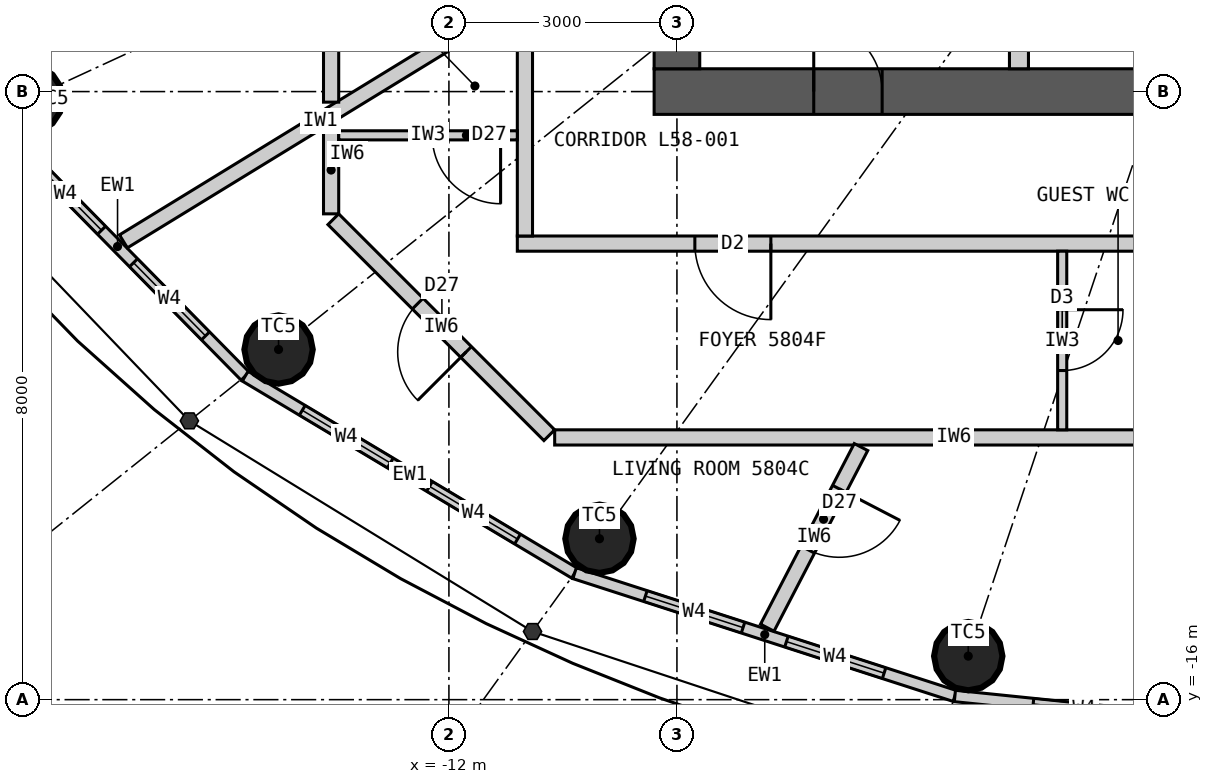
"""IFC4 building model, lengths in metres.
Left out: names, types, materials, properties, quantities, classifications, styles, units other than length and angle.
Written with IfcOpenShell. Run it as: python <this file> out.ifc"""

import sys

from ifc_helpers import new_model, si_unit, direction, frame, frame_2d, origin, origin_2d, place, context, subcontext, project, spatial, rectangle, circle, extrude, element, fill, save


model = new_model("IFC4")
c1 = context("Model", 3, precision=1e-05, world=origin(), true_north=direction((0.0, 1.0)))
c2 = subcontext(c1, "Body", "Model", "MODEL_VIEW")
j1 = project(units=[si_unit("LENGTHUNIT", "METRE"), si_unit("PLANEANGLEUNIT", "RADIAN")], contexts=[c1])
p1 = place(None, origin())
s1 = spatial("IfcSite", under=j1, at=p1, CompositionType="ELEMENT")
p2 = place(p1, origin())
s2 = spatial("IfcBuilding", under=s1, at=p2, CompositionType="ELEMENT")
p3 = place(p2, frame((0.0, 0.0, 216.0)))
s3 = spatial("IfcBuildingStorey", under=s2, at=p3, CompositionType="ELEMENT", Elevation=216.0)
for number, where, z_axis, x_axis in (
    (1, (-17.532, -8.098, 0.0), (0.0, 0.0, 1.0), (1.0, 0.0, 0.0)),
    (2, (-14.241, -11.393, 0.0), (0.0, 0.0, 1.0), (1.0, 0.0, 0.0)),
    (3, (-10.019, -13.883, 0.0), (0.0, 0.0, 1.0), (1.0, 0.0, 0.0)),
    (4, (-5.167, -15.427, 0.0), (0.0, 0.0, 1.0), (1.0, 0.0, 0.0)),
):
    element("IfcColumn", number, at=place(p3, frame(where, z_axis=z_axis, x_axis=x_axis)), inside=s3, PredefinedType="COLUMN", context=c2, shape_type="SweptSolid", body=[
        extrude(circle(Radius=0.45, at=origin_2d()), origin(), (0.0, 0.0, 1.0), 3.3),
    ])
p4 = place(p3, frame((9.3, -8.0, 0.0), z_axis=(0.0, 0.0, 1.0), x_axis=(-1.0, 0.0, 0.0)))
e5 = element("IfcWall", 5, at=p4, inside=s3, PredefinedType="SHEAR", context=c2, shape_type="SweptSolid", body=[
    extrude(rectangle(XDim=18.6, YDim=0.6, at=frame_2d((9.3, 0.0))), origin(), (0.0, 0.0, 1.0), 3.3),
])
p5 = place(p4, frame((8.0, 0.0, 0.0)))
e6 = element("IfcOpeningElement", 6, at=p5, cuts=e5, PredefinedType="OPENING", context=c2, shape_type="SweptSolid", body=[
    extrude(rectangle(XDim=1.2, YDim=2.2, at=frame_2d((0.6, 1.1))), frame((0.0, 0.31, 0.0), z_axis=(0.0, -1.0, 0.0), x_axis=(1.0, 0.0, 0.0)), (0.0, 0.0, 1.0), 0.62),
])
p6 = place(p4, frame((15.6, 0.0, 0.0)))
e7 = element("IfcOpeningElement", 7, at=p6, cuts=e5, PredefinedType="OPENING", context=c2, shape_type="SweptSolid", body=[
    extrude(rectangle(XDim=0.9, YDim=2.2, at=frame_2d((0.45, 1.1))), frame((0.0, 0.31, 0.0), z_axis=(0.0, -1.0, 0.0), x_axis=(1.0, 0.0, 0.0)), (0.0, 0.0, 1.0), 0.62),
])
p7 = place(p3, frame((-9.0, 7.7, 0.0), z_axis=(0.0, 0.0, 1.0), x_axis=(0.0, -1.0, 0.0)))
e8 = element("IfcWall", 8, at=p7, inside=s3, PredefinedType="SHEAR", context=c2, shape_type="SweptSolid", body=[
    extrude(rectangle(XDim=15.4, YDim=0.6, at=frame_2d((7.7, 0.0))), origin(), (0.0, 0.0, 1.0), 3.3),
])
p8 = place(p7, frame((6.8, 0.0, 0.0)))
e9 = element("IfcOpeningElement", 9, at=p8, cuts=e8, PredefinedType="OPENING", context=c2, shape_type="SweptSolid", body=[
    extrude(rectangle(XDim=1.8, YDim=2.2, at=frame_2d((0.9, 1.1))), frame((0.0, 0.31, 0.0), z_axis=(0.0, -1.0, 0.0), x_axis=(1.0, 0.0, 0.0)), (0.0, 0.0, 1.0), 0.62),
])
p9 = place(p3, frame((-4.5, -7.7, 0.0), z_axis=(0.0, 0.0, 1.0), x_axis=(0.0, 1.0, 0.0)))
e10 = element("IfcWall", 10, at=p9, inside=s3, PredefinedType="PARTITIONING", context=c2, shape_type="SweptSolid", body=[
    extrude(rectangle(XDim=3.2, YDim=0.25, at=frame_2d((1.6, 0.0))), origin(), (0.0, 0.0, 1.0), 3.3),
])
p10 = place(p3, frame((-18.04, -8.332, 0.0), z_axis=(0.0, 0.0, 1.0), x_axis=(0.701527379618, -0.712642501993, 0.0)))
e11 = element("IfcWall", 11, at=p10, inside=s3, PredefinedType="ELEMENTEDWALL", context=c2, shape_type="SweptSolid", body=[
    extrude(rectangle(XDim=4.788, YDim=0.15, at=frame_2d((2.394, 0.0))), origin(), (0.0, 0.0, 1.0), 3.12),
])
p11 = place(p10, frame((0.744, 0.0, 0.9)))
e12 = element("IfcOpeningElement", 12, at=p11, cuts=e11, PredefinedType="OPENING", context=c2, shape_type="SweptSolid", body=[
    extrude(rectangle(XDim=1.35, YDim=1.9, at=frame_2d((0.675, 0.95))), frame((0.0, 0.085, 0.0), z_axis=(0.0, -1.0, 0.0), x_axis=(1.0, 0.0, 0.0)), (0.0, 0.0, 1.0), 0.17),
])
p12 = place(p10, frame((2.694, 0.0, 0.9)))
e13 = element("IfcOpeningElement", 13, at=p12, cuts=e11, PredefinedType="OPENING", context=c2, shape_type="SweptSolid", body=[
    extrude(rectangle(XDim=1.35, YDim=1.9, at=frame_2d((0.675, 0.95))), frame((0.0, 0.085, 0.0), z_axis=(0.0, -1.0, 0.0), x_axis=(1.0, 0.0, 0.0)), (0.0, 0.0, 1.0), 0.17),
])
p13 = place(p3, frame((-14.68, -11.744, 0.0), z_axis=(0.0, 0.0, 1.0), x_axis=(0.85822150553, -0.513279502265, 0.0)))
e14 = element("IfcWall", 14, at=p13, inside=s3, PredefinedType="ELEMENTEDWALL", context=c2, shape_type="SweptSolid", body=[
    extrude(rectangle(XDim=5.05, YDim=0.15, at=frame_2d((2.525, 0.0))), origin(), (0.0, 0.0, 1.0), 3.12),
])
p14 = place(p13, frame((0.875, 0.0, 0.9)))
e15 = element("IfcOpeningElement", 15, at=p14, cuts=e14, PredefinedType="OPENING", context=c2, shape_type="SweptSolid", body=[
    extrude(rectangle(XDim=1.35, YDim=1.9, at=frame_2d((0.675, 0.95))), frame((0.0, 0.085, 0.0), z_axis=(0.0, -1.0, 0.0), x_axis=(1.0, 0.0, 0.0)), (0.0, 0.0, 1.0), 0.17),
])
p15 = place(p13, frame((2.825, 0.0, 0.9)))
e16 = element("IfcOpeningElement", 16, at=p15, cuts=e14, PredefinedType="OPENING", context=c2, shape_type="SweptSolid", body=[
    extrude(rectangle(XDim=1.35, YDim=1.9, at=frame_2d((0.675, 0.95))), frame((0.0, 0.085, 0.0), z_axis=(0.0, -1.0, 0.0), x_axis=(1.0, 0.0, 0.0)), (0.0, 0.0, 1.0), 0.17),
])
p16 = place(p3, frame((-10.346, -14.336, 0.0), z_axis=(0.0, 0.0, 1.0), x_axis=(0.951644702515, -0.307200846638, 0.0)))
e17 = element("IfcWall", 17, at=p16, inside=s3, PredefinedType="ELEMENTEDWALL", context=c2, shape_type="SweptSolid", body=[
    extrude(rectangle(XDim=5.258, YDim=0.15, at=frame_2d((2.629, 0.0))), origin(), (0.0, 0.0, 1.0), 3.12),
])
p17 = place(p16, frame((0.979, 0.0, 0.9)))
e18 = element("IfcOpeningElement", 18, at=p17, cuts=e17, PredefinedType="OPENING", context=c2, shape_type="SweptSolid", body=[
    extrude(rectangle(XDim=1.35, YDim=1.9, at=frame_2d((0.675, 0.95))), frame((0.0, 0.085, 0.0), z_axis=(0.0, -1.0, 0.0), x_axis=(1.0, 0.0, 0.0)), (0.0, 0.0, 1.0), 0.17),
])
p18 = place(p16, frame((2.929, 0.0, 0.9)))
e19 = element("IfcOpeningElement", 19, at=p18, cuts=e17, PredefinedType="OPENING", context=c2, shape_type="SweptSolid", body=[
    extrude(rectangle(XDim=1.35, YDim=1.9, at=frame_2d((0.675, 0.95))), frame((0.0, 0.085, 0.0), z_axis=(0.0, -1.0, 0.0), x_axis=(1.0, 0.0, 0.0)), (0.0, 0.0, 1.0), 0.17),
])
p19 = place(p3, frame((-5.343, -15.952, 0.0), z_axis=(0.0, 0.0, 1.0), x_axis=(0.994774574972, -0.102095763818, 0.0)))
e20 = element("IfcWall", 20, at=p19, inside=s3, PredefinedType="ELEMENTEDWALL", context=c2, shape_type="SweptSolid", body=[
    extrude(rectangle(XDim=5.371, YDim=0.15, at=frame_2d((2.686, 0.0))), origin(), (0.0, 0.0, 1.0), 3.12),
])
p20 = place(p19, frame((1.035, 0.0, 0.9)))
e21 = element("IfcOpeningElement", 21, at=p20, cuts=e20, PredefinedType="OPENING", context=c2, shape_type="SweptSolid", body=[
    extrude(rectangle(XDim=1.35, YDim=1.9, at=frame_2d((0.675, 0.95))), frame((0.0, 0.085, 0.0), z_axis=(0.0, -1.0, 0.0), x_axis=(1.0, 0.0, 0.0)), (0.0, 0.0, 1.0), 0.17),
])
p21 = place(p19, frame((2.985, 0.0, 0.9)))
e22 = element("IfcOpeningElement", 22, at=p21, cuts=e20, PredefinedType="OPENING", context=c2, shape_type="SweptSolid", body=[
    extrude(rectangle(XDim=1.35, YDim=1.9, at=frame_2d((0.675, 0.95))), frame((0.0, 0.085, 0.0), z_axis=(0.0, -1.0, 0.0), x_axis=(1.0, 0.0, 0.0)), (0.0, 0.0, 1.0), 0.17),
])
p22 = place(p3, frame((11.1, -10.0, 0.0), z_axis=(0.0, 0.0, 1.0), x_axis=(-1.0, 0.0, 0.0)))
e23 = element("IfcWall", 23, at=p22, inside=s3, PredefinedType="PARTITIONING", context=c2, shape_type="SweptSolid", body=[
    extrude(rectangle(XDim=22.2, YDim=0.2, at=frame_2d((11.1, 0.0))), origin(), (0.0, 0.0, 1.0), 3.12),
])
p23 = place(p22, frame((18.864, 0.0, 0.0)))
e24 = element("IfcOpeningElement", 24, at=p23, cuts=e23, PredefinedType="OPENING", context=c2, shape_type="SweptSolid", body=[
    extrude(rectangle(XDim=1.0, YDim=2.2, at=frame_2d((0.5, 1.1))), frame((0.0, 0.11, 0.0), z_axis=(0.0, -1.0, 0.0), x_axis=(1.0, 0.0, 0.0)), (0.0, 0.0, 1.0), 0.22),
])
p24 = place(p22, frame((2.309, 0.0, 0.0)))
e25 = element("IfcOpeningElement", 25, at=p24, cuts=e23, PredefinedType="OPENING", context=c2, shape_type="SweptSolid", body=[
    extrude(rectangle(XDim=1.0, YDim=2.2, at=frame_2d((0.5, 1.1))), frame((0.0, 0.11, 0.0), z_axis=(0.0, -1.0, 0.0), x_axis=(1.0, 0.0, 0.0)), (0.0, 0.0, 1.0), 0.22),
])
p25 = place(p3, frame((-11.0, -2.234, 0.0), z_axis=(0.0, 0.0, 1.0), x_axis=(0.0, -1.0, 0.0)))
e26 = element("IfcWall", 26, at=p25, inside=s3, PredefinedType="PARTITIONING", context=c2, shape_type="SweptSolid", body=[
    extrude(rectangle(XDim=7.666, YDim=0.2, at=frame_2d((3.833, 0.0))), origin(), (0.0, 0.0, 1.0), 3.12),
])
p26 = place(p3, frame((-11.1, -6.797, 0.0), z_axis=(0.0, 0.0, 1.0), x_axis=(-0.852799818179, -0.522237943963, 0.0)))
e27 = element("IfcWall", 27, at=p26, inside=s3, PredefinedType="PARTITIONING", context=c2, shape_type="SweptSolid", body=[
    extrude(rectangle(XDim=6.077, YDim=0.2, at=frame_2d((3.039, 0.0))), origin(), (0.0, 0.0, 1.0), 3.12),
])
p27 = place(p3, frame((-13.55, 4.357, 0.0), z_axis=(0.0, 0.0, 1.0), x_axis=(0.0, -1.0, 0.0)))
e28 = element("IfcWall", 28, at=p27, inside=s3, PredefinedType="PARTITIONING", context=c2, shape_type="SweptSolid", body=[
    extrude(rectangle(XDim=12.496, YDim=0.2, at=frame_2d((6.248, 0.0))), origin(), (0.0, 0.0, 1.0), 3.12),
])
p28 = place(p27, frame((1.92, 0.0, 0.0)))
e29 = element("IfcOpeningElement", 29, at=p28, cuts=e28, PredefinedType="OPENING", context=c2, shape_type="SweptSolid", body=[
    extrude(rectangle(XDim=0.8, YDim=2.1, at=frame_2d((0.4, 1.05))), frame((0.0, 0.11, 0.0), z_axis=(0.0, -1.0, 0.0), x_axis=(1.0, 0.0, 0.0)), (0.0, 0.0, 1.0), 0.22),
])
p29 = place(p27, frame((9.27, 0.0, 0.0)))
e30 = element("IfcOpeningElement", 30, at=p29, cuts=e28, PredefinedType="OPENING", context=c2, shape_type="SweptSolid", body=[
    extrude(rectangle(XDim=0.8, YDim=2.1, at=frame_2d((0.4, 1.05))), frame((0.0, 0.11, 0.0), z_axis=(0.0, -1.0, 0.0), x_axis=(1.0, 0.0, 0.0)), (0.0, 0.0, 1.0), 0.22),
])
p30 = place(p27, frame((5.557, 0.0, 0.0)))
e31 = element("IfcOpeningElement", 31, at=p30, cuts=e28, PredefinedType="OPENING", context=c2, shape_type="SweptSolid", body=[
    extrude(rectangle(XDim=0.9, YDim=2.1, at=frame_2d((0.45, 1.05))), frame((0.0, 0.11, 0.0), z_axis=(0.0, -1.0, 0.0), x_axis=(1.0, 0.0, 0.0)), (0.0, 0.0, 1.0), 0.22),
])
p31 = place(p3, frame((-13.55, -8.456, 0.0), z_axis=(0.0, 0.0, 1.0), x_axis=(0.0, -1.0, 0.0)))
e32 = element("IfcWall", 32, at=p31, inside=s3, PredefinedType="PARTITIONING", context=c2, shape_type="SweptSolid", body=[
    extrude(rectangle(XDim=1.153, YDim=0.2, at=frame_2d((0.576, 0.0))), origin(), (0.0, 0.0, 1.0), 3.12),
])
p32 = place(p3, frame((-13.521, -9.679, 0.0), z_axis=(0.0, 0.0, 1.0), x_axis=(0.707106781187, -0.707106781187, 0.0)))
e33 = element("IfcWall", 33, at=p32, inside=s3, PredefinedType="PARTITIONING", context=c2, shape_type="SweptSolid", body=[
    extrude(rectangle(XDim=4.019, YDim=0.2, at=frame_2d((2.009, 0.0))), origin(), (0.0, 0.0, 1.0), 3.12),
])
p33 = place(p32, frame((1.57, 0.0, 0.0)))
e34 = element("IfcOpeningElement", 34, at=p33, cuts=e33, PredefinedType="OPENING", context=c2, shape_type="SweptSolid", body=[
    extrude(rectangle(XDim=0.9, YDim=2.1, at=frame_2d((0.45, 1.05))), frame((0.0, 0.11, 0.0), z_axis=(0.0, -1.0, 0.0), x_axis=(1.0, 0.0, 0.0)), (0.0, 0.0, 1.0), 0.22),
])
p34 = place(p3, frame((-10.609, -12.55, 0.0), z_axis=(0.0, 0.0, 1.0), x_axis=(1.0, 0.0, 0.0)))
e35 = element("IfcWall", 35, at=p34, inside=s3, PredefinedType="PARTITIONING", context=c2, shape_type="SweptSolid", body=[
    extrude(rectangle(XDim=10.508, YDim=0.2, at=frame_2d((5.254, 0.0))), origin(), (0.0, 0.0, 1.0), 3.12),
])
p35 = place(p34, frame((8.308, 0.0, 0.0)))
e36 = element("IfcOpeningElement", 36, at=p35, cuts=e35, PredefinedType="OPENING", context=c2, shape_type="SweptSolid", body=[
    extrude(rectangle(XDim=0.8, YDim=2.1, at=frame_2d((0.4, 1.05))), frame((0.0, 0.11, 0.0), z_axis=(0.0, -1.0, 0.0), x_axis=(1.0, 0.0, 0.0)), (0.0, 0.0, 1.0), 0.22),
])
p36 = place(p3, frame((-6.578, -12.677, 0.0), z_axis=(0.0, 0.0, 1.0), x_axis=(-0.460620531465, -0.887597164255, 0.0)))
e37 = element("IfcWall", 37, at=p36, inside=s3, PredefinedType="PARTITIONING", context=c2, shape_type="SweptSolid", body=[
    extrude(rectangle(XDim=2.678, YDim=0.2, at=frame_2d((1.339, 0.0))), origin(), (0.0, 0.0, 1.0), 3.12),
])
p37 = place(p36, frame((0.62, 0.0, 0.0)))
e38 = element("IfcOpeningElement", 38, at=p37, cuts=e37, PredefinedType="OPENING", context=c2, shape_type="SweptSolid", body=[
    extrude(rectangle(XDim=0.9, YDim=2.1, at=frame_2d((0.45, 1.05))), frame((0.0, 0.11, 0.0), z_axis=(0.0, -1.0, 0.0), x_axis=(1.0, 0.0, 0.0)), (0.0, 0.0, 1.0), 0.22),
])
p38 = place(p3, frame((-11.1, -8.576, 0.0), z_axis=(0.0, 0.0, 1.0), x_axis=(-1.0, 0.0, 0.0)))
e39 = element("IfcWall", 39, at=p38, inside=s3, PredefinedType="PARTITIONING", context=c2, shape_type="SweptSolid", body=[
    extrude(rectangle(XDim=2.35, YDim=0.12, at=frame_2d((1.175, 0.0))), origin(), (0.0, 0.0, 1.0), 3.12),
])
p39 = place(p38, frame((0.22, 0.0, 0.0)))
e40 = element("IfcOpeningElement", 40, at=p39, cuts=e39, PredefinedType="OPENING", context=c2, shape_type="SweptSolid", body=[
    extrude(rectangle(XDim=0.9, YDim=2.1, at=frame_2d((0.45, 1.05))), frame((0.0, 0.07, 0.0), z_axis=(0.0, -1.0, 0.0), x_axis=(1.0, 0.0, 0.0)), (0.0, 0.0, 1.0), 0.14),
])
p40 = place(p3, frame((-3.931, -10.1, 0.0), z_axis=(0.0, 0.0, 1.0), x_axis=(0.0, -1.0, 0.0)))
e41 = element("IfcWall", 41, at=p40, inside=s3, PredefinedType="PARTITIONING", context=c2, shape_type="SweptSolid", body=[
    extrude(rectangle(XDim=2.35, YDim=0.12, at=frame_2d((1.175, 0.0))), origin(), (0.0, 0.0, 1.0), 3.12),
])
p41 = place(p40, frame((0.77, 0.0, 0.0)))
e42 = element("IfcOpeningElement", 42, at=p41, cuts=e41, PredefinedType="OPENING", context=c2, shape_type="SweptSolid", body=[
    extrude(rectangle(XDim=0.8, YDim=2.1, at=frame_2d((0.4, 1.05))), frame((0.0, 0.07, 0.0), z_axis=(0.0, -1.0, 0.0), x_axis=(1.0, 0.0, 0.0)), (0.0, 0.0, 1.0), 0.14),
])
p42 = place(p11, origin())
e43 = element("IfcWindow", 43, at=p42, inside=s3, PartitioningType="SINGLE_PANEL", PredefinedType="WINDOW", context=c2, shape_type="SweptSolid", body=[
    extrude(rectangle(XDim=1.35, YDim=1.9, at=frame_2d((0.675, 0.95))), frame((0.0, 0.03, 0.0), z_axis=(0.0, -1.0, 0.0), x_axis=(1.0, 0.0, 0.0)), (0.0, 0.0, 1.0), 0.06),
])
fill(e12, e43)
p43 = place(p12, origin())
e44 = element("IfcWindow", 44, at=p43, inside=s3, PartitioningType="SINGLE_PANEL", PredefinedType="WINDOW", context=c2, shape_type="SweptSolid", body=[
    extrude(rectangle(XDim=1.35, YDim=1.9, at=frame_2d((0.675, 0.95))), frame((0.0, 0.03, 0.0), z_axis=(0.0, -1.0, 0.0), x_axis=(1.0, 0.0, 0.0)), (0.0, 0.0, 1.0), 0.06),
])
fill(e13, e44)
p44 = place(p14, origin())
e45 = element("IfcWindow", 45, at=p44, inside=s3, PartitioningType="SINGLE_PANEL", PredefinedType="WINDOW", context=c2, shape_type="SweptSolid", body=[
    extrude(rectangle(XDim=1.35, YDim=1.9, at=frame_2d((0.675, 0.95))), frame((0.0, 0.03, 0.0), z_axis=(0.0, -1.0, 0.0), x_axis=(1.0, 0.0, 0.0)), (0.0, 0.0, 1.0), 0.06),
])
fill(e15, e45)
p45 = place(p15, origin())
e46 = element("IfcWindow", 46, at=p45, inside=s3, PartitioningType="SINGLE_PANEL", PredefinedType="WINDOW", context=c2, shape_type="SweptSolid", body=[
    extrude(rectangle(XDim=1.35, YDim=1.9, at=frame_2d((0.675, 0.95))), frame((0.0, 0.03, 0.0), z_axis=(0.0, -1.0, 0.0), x_axis=(1.0, 0.0, 0.0)), (0.0, 0.0, 1.0), 0.06),
])
fill(e16, e46)
p46 = place(p17, origin())
e47 = element("IfcWindow", 47, at=p46, inside=s3, PartitioningType="SINGLE_PANEL", PredefinedType="WINDOW", context=c2, shape_type="SweptSolid", body=[
    extrude(rectangle(XDim=1.35, YDim=1.9, at=frame_2d((0.675, 0.95))), frame((0.0, 0.03, 0.0), z_axis=(0.0, -1.0, 0.0), x_axis=(1.0, 0.0, 0.0)), (0.0, 0.0, 1.0), 0.06),
])
fill(e18, e47)
p47 = place(p18, origin())
e48 = element("IfcWindow", 48, at=p47, inside=s3, PartitioningType="SINGLE_PANEL", PredefinedType="WINDOW", context=c2, shape_type="SweptSolid", body=[
    extrude(rectangle(XDim=1.35, YDim=1.9, at=frame_2d((0.675, 0.95))), frame((0.0, 0.03, 0.0), z_axis=(0.0, -1.0, 0.0), x_axis=(1.0, 0.0, 0.0)), (0.0, 0.0, 1.0), 0.06),
])
fill(e19, e48)
p48 = place(p20, origin())
e49 = element("IfcWindow", 49, at=p48, inside=s3, PartitioningType="SINGLE_PANEL", PredefinedType="WINDOW", context=c2, shape_type="SweptSolid", body=[
    extrude(rectangle(XDim=1.35, YDim=1.9, at=frame_2d((0.675, 0.95))), frame((0.0, 0.03, 0.0), z_axis=(0.0, -1.0, 0.0), x_axis=(1.0, 0.0, 0.0)), (0.0, 0.0, 1.0), 0.06),
])
fill(e21, e49)
p49 = place(p23, origin())
e50 = element("IfcDoor", 50, at=p49, inside=s3, OperationType="SINGLE_SWING_LEFT", PredefinedType="DOOR", context=c2, shape_type="SweptSolid", body=[
    extrude(rectangle(XDim=1.0, YDim=2.2, at=frame_2d((0.5, 1.1))), frame((0.0, 0.025, 0.0), z_axis=(0.0, -1.0, 0.0), x_axis=(1.0, 0.0, 0.0)), (0.0, 0.0, 1.0), 0.05),
])
fill(e24, e50)
p50 = place(p39, origin())
e51 = element("IfcDoor", 51, at=p50, inside=s3, OperationType="SINGLE_SWING_LEFT", PredefinedType="DOOR", context=c2, shape_type="SweptSolid", body=[
    extrude(rectangle(XDim=0.9, YDim=2.1, at=frame_2d((0.45, 1.05))), frame((0.0, 0.025, 0.0), z_axis=(0.0, -1.0, 0.0), x_axis=(1.0, 0.0, 0.0)), (0.0, 0.0, 1.0), 0.05),
])
fill(e40, e51)
p51 = place(p41, origin())
e52 = element("IfcDoor", 52, at=p51, inside=s3, OperationType="SINGLE_SWING_LEFT", PredefinedType="DOOR", context=c2, shape_type="SweptSolid", body=[
    extrude(rectangle(XDim=0.8, YDim=2.1, at=frame_2d((0.4, 1.05))), frame((0.0, 0.025, 0.0), z_axis=(0.0, -1.0, 0.0), x_axis=(1.0, 0.0, 0.0)), (0.0, 0.0, 1.0), 0.05),
])
fill(e42, e52)
p52 = place(p33, origin())
e53 = element("IfcDoor", 53, at=p52, inside=s3, OperationType="SINGLE_SWING_RIGHT", PredefinedType="DOOR", context=c2, shape_type="SweptSolid", body=[
    extrude(rectangle(XDim=0.9, YDim=2.1, at=frame_2d((0.45, 1.05))), frame((0.0, 0.025, 0.0), z_axis=(0.0, -1.0, 0.0), x_axis=(1.0, 0.0, 0.0)), (0.0, 0.0, 1.0), 0.05),
])
fill(e34, e53)
p53 = place(p37, origin())
e54 = element("IfcDoor", 54, at=p53, inside=s3, OperationType="SINGLE_SWING_LEFT", PredefinedType="DOOR", context=c2, shape_type="SweptSolid", body=[
    extrude(rectangle(XDim=0.9, YDim=2.1, at=frame_2d((0.45, 1.05))), frame((0.0, 0.025, 0.0), z_axis=(0.0, -1.0, 0.0), x_axis=(1.0, 0.0, 0.0)), (0.0, 0.0, 1.0), 0.05),
])
fill(e38, e54)
p54 = place(p6, origin())
e55 = element("IfcDoor", 55, at=p54, inside=s3, OperationType="SINGLE_SWING_RIGHT", PredefinedType="DOOR", context=c2, shape_type="SweptSolid", body=[
    extrude(rectangle(XDim=0.9, YDim=2.2, at=frame_2d((0.45, 1.1))), frame((0.0, 0.025, 0.0), z_axis=(0.0, -1.0, 0.0), x_axis=(1.0, 0.0, 0.0)), (0.0, 0.0, 1.0), 0.05),
])
fill(e7, e55)
save(model, sys.argv[1])
